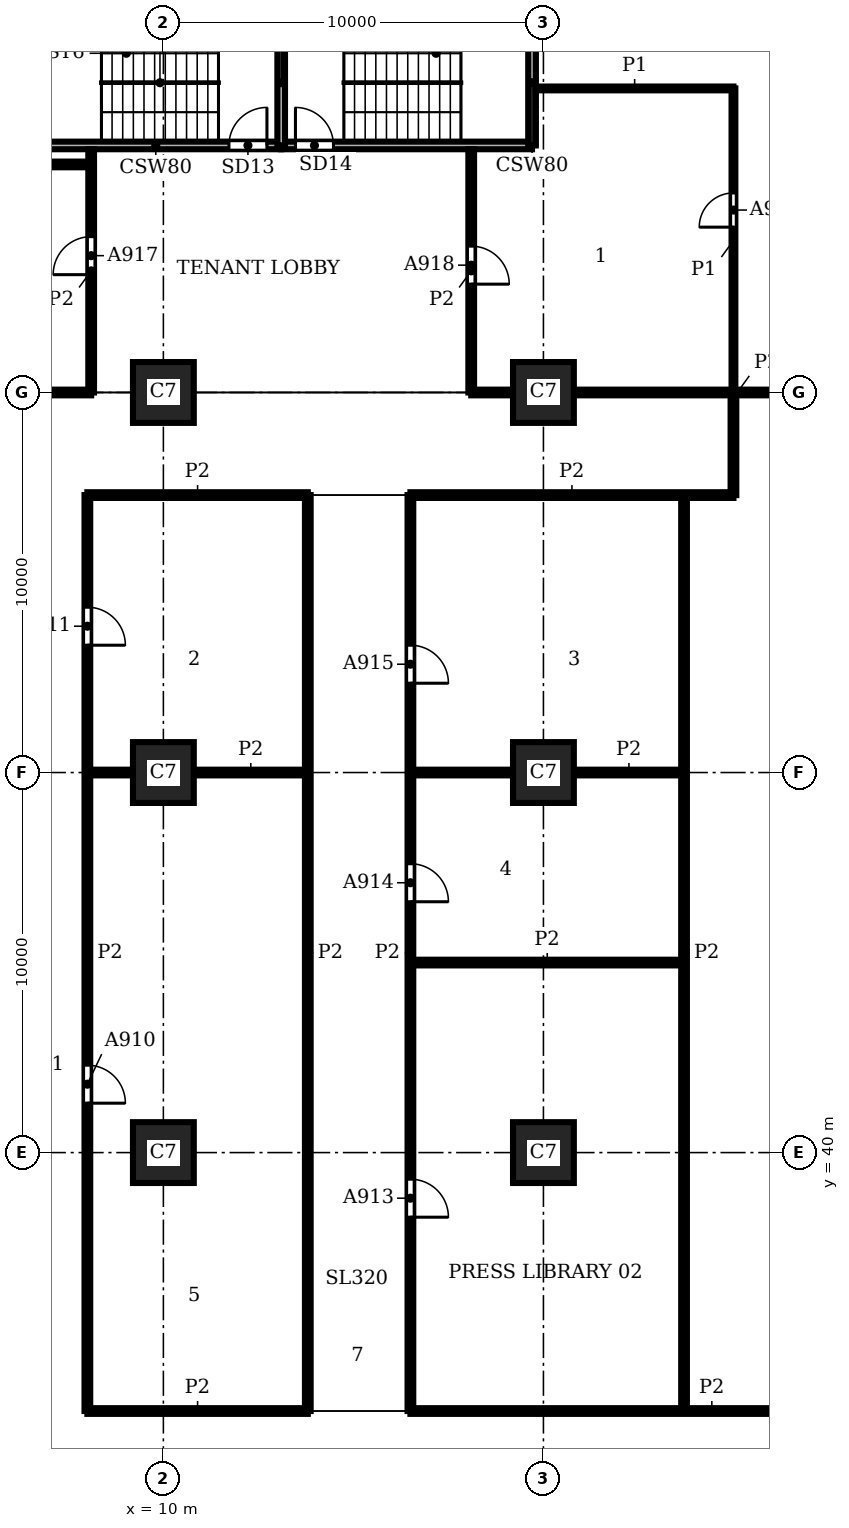
"""IFC4 building model, lengths in metres.
Left out: names, types, materials, properties, quantities, classifications, styles, units other than length and angle.
Written with IfcOpenShell. Run it as: python <this file> out.ifc"""

import sys

from ifc_helpers import new_model, si_unit, direction, frame, frame_2d, origin, origin_2d, place, context, subcontext, project, spatial, rectangle, extrude, element, fill, save


model = new_model("IFC4")
c1 = context("Model", 3, precision=1e-05, world=origin(), true_north=direction((0.0, 1.0)))
c2 = subcontext(c1, "Body", "Model", "MODEL_VIEW")
j1 = project(units=[si_unit("LENGTHUNIT", "METRE"), si_unit("PLANEANGLEUNIT", "RADIAN")], contexts=[c1])
p1 = place(None, origin())
s1 = spatial("IfcSite", under=j1, at=p1, CompositionType="ELEMENT")
p2 = place(p1, origin())
s2 = spatial("IfcBuilding", under=s1, at=p2, CompositionType="ELEMENT")
p3 = place(p2, frame((0.0, 0.0, 113.4)))
s3 = spatial("IfcBuildingStorey", under=s2, at=p3, CompositionType="ELEMENT", Elevation=113.4)
for number, where, z_axis, x_axis in (
    (1, (10.0, 40.0, 0.0), (0.0, 0.0, 1.0), (1.0, 0.0, 0.0)),
    (2, (10.0, 50.0, 0.0), (0.0, 0.0, 1.0), (1.0, 0.0, 0.0)),
    (3, (10.0, 60.0, 0.0), (0.0, 0.0, 1.0), (1.0, 0.0, 0.0)),
    (4, (20.0, 40.0, 0.0), (0.0, 0.0, 1.0), (1.0, 0.0, 0.0)),
    (5, (20.0, 50.0, 0.0), (0.0, 0.0, 1.0), (1.0, 0.0, 0.0)),
    (6, (20.0, 60.0, 0.0), (0.0, 0.0, 1.0), (1.0, 0.0, 0.0)),
):
    element("IfcColumn", number, at=place(p3, frame(where, z_axis=z_axis, x_axis=x_axis)), inside=s3, PredefinedType="COLUMN", context=c2, shape_type="SweptSolid", body=[
        extrude(rectangle(XDim=1.6, YDim=1.6, at=origin_2d()), origin(), (0.0, 0.0, 1.0), 3.9),
    ])
p4 = place(p3, frame((6.5, 66.5, 0.0), z_axis=(0.0, 0.0, 1.0), x_axis=(1.0, 0.0, 0.0)))
e7 = element("IfcWall", 7, at=p4, inside=s3, PredefinedType="SHEAR", context=c2, shape_type="SweptSolid", body=[
    extrude(rectangle(XDim=6.6, YDim=0.2, at=frame_2d((3.3, 0.0))), origin(), (0.0, 0.0, 1.0), 3.45),
])
p5 = place(p4, frame((5.225, 0.0, 0.0)))
e8 = element("IfcOpeningElement", 8, at=p5, cuts=e7, PredefinedType="OPENING", context=c2, shape_type="SweptSolid", body=[
    extrude(rectangle(XDim=1.0, YDim=2.1, at=frame_2d((0.5, 1.05))), frame((0.0, 0.11, 0.0), z_axis=(0.0, -1.0, 0.0), x_axis=(1.0, 0.0, 0.0)), (0.0, 0.0, 1.0), 0.22),
])
p6 = place(p3, frame((13.1, 66.5, 0.0), z_axis=(0.0, 0.0, 1.0), x_axis=(1.0, 0.0, 0.0)))
e9 = element("IfcWall", 9, at=p6, inside=s3, PredefinedType="SHEAR", context=c2, shape_type="SweptSolid", body=[
    extrude(rectangle(XDim=6.6, YDim=0.2, at=frame_2d((3.3, 0.0))), origin(), (0.0, 0.0, 1.0), 3.45),
])
p7 = place(p6, frame((0.375, 0.0, 0.0)))
e10 = element("IfcOpeningElement", 10, at=p7, cuts=e9, PredefinedType="OPENING", context=c2, shape_type="SweptSolid", body=[
    extrude(rectangle(XDim=1.0, YDim=2.1, at=frame_2d((0.5, 1.05))), frame((0.0, 0.11, 0.0), z_axis=(0.0, -1.0, 0.0), x_axis=(1.0, 0.0, 0.0)), (0.0, 0.0, 1.0), 0.22),
])
for number, where, z_axis, x_axis in (
    (11, (13.1, 66.5, 0.0), (0.0, 0.0, 1.0), (0.0, 1.0, 0.0)),
    (12, (19.7, 66.5, 0.0), (0.0, 0.0, 1.0), (0.0, 1.0, 0.0)),
):
    element("IfcWall", number, at=place(p3, frame(where, z_axis=z_axis, x_axis=x_axis)), inside=s3, PredefinedType="SHEAR", context=c2, shape_type="SweptSolid", body=[
        extrude(rectangle(XDim=3.3, YDim=0.2, at=frame_2d((1.65, 0.0))), origin(), (0.0, 0.0, 1.0), 3.45),
    ])
p8 = place(p3, frame((25.0, 60.0, 0.0), z_axis=(0.0, 0.0, 1.0), x_axis=(0.0, 1.0, 0.0)))
e13 = element("IfcWall", 13, at=p8, inside=s3, PredefinedType="PARTITIONING", context=c2, shape_type="SweptSolid", body=[
    extrude(rectangle(XDim=8.0, YDim=0.1, at=frame_2d((4.0, 0.0))), origin(), (0.0, 0.0, 1.0), 3.45),
])
p9 = place(p8, frame((4.35, 0.0, 0.0)))
e14 = element("IfcOpeningElement", 14, at=p9, cuts=e13, PredefinedType="OPENING", context=c2, shape_type="SweptSolid", body=[
    extrude(rectangle(XDim=0.9, YDim=2.1, at=frame_2d((0.45, 1.05))), frame((0.0, 0.06, 0.0), z_axis=(0.0, -1.0, 0.0), x_axis=(1.0, 0.0, 0.0)), (0.0, 0.0, 1.0), 0.12),
])
p10 = place(p3, frame((19.8, 68.0, 0.0), z_axis=(0.0, 0.0, 1.0), x_axis=(1.0, 0.0, 0.0)))
e15 = element("IfcWall", 15, at=p10, inside=s3, PredefinedType="PARTITIONING", context=c2, shape_type="SweptSolid", body=[
    extrude(rectangle(XDim=5.2, YDim=0.1, at=frame_2d((2.6, 0.0))), origin(), (0.0, 0.0, 1.0), 3.45),
])
p11 = place(p3, frame((8.0, 33.2, 0.0), z_axis=(0.0, 0.0, 1.0), x_axis=(0.0, 1.0, 0.0)))
e16 = element("IfcWall", 16, at=p11, inside=s3, PredefinedType="PARTITIONING", context=c2, shape_type="SweptSolid", body=[
    extrude(rectangle(XDim=24.1, YDim=0.15, at=frame_2d((12.05, 0.0))), origin(), (0.0, 0.0, 1.0), 3.45),
])
p12 = place(p11, frame((8.1, 0.0, 0.0)))
e17 = element("IfcOpeningElement", 17, at=p12, cuts=e16, PredefinedType="OPENING", context=c2, shape_type="SweptSolid", body=[
    extrude(rectangle(XDim=1.0, YDim=2.1, at=frame_2d((0.5, 1.05))), frame((0.0, 0.085, 0.0), z_axis=(0.0, -1.0, 0.0), x_axis=(1.0, 0.0, 0.0)), (0.0, 0.0, 1.0), 0.17),
])
p13 = place(p11, frame((20.15, 0.0, 0.0)))
e18 = element("IfcOpeningElement", 18, at=p13, cuts=e16, PredefinedType="OPENING", context=c2, shape_type="SweptSolid", body=[
    extrude(rectangle(XDim=1.0, YDim=2.1, at=frame_2d((0.5, 1.05))), frame((0.0, 0.085, 0.0), z_axis=(0.0, -1.0, 0.0), x_axis=(1.0, 0.0, 0.0)), (0.0, 0.0, 1.0), 0.17),
])
p14 = place(p3, frame((8.1, 60.0, 0.0), z_axis=(0.0, 0.0, 1.0), x_axis=(0.0, 1.0, 0.0)))
e19 = element("IfcWall", 19, at=p14, inside=s3, PredefinedType="PARTITIONING", context=c2, shape_type="SweptSolid", body=[
    extrude(rectangle(XDim=6.4, YDim=0.15, at=frame_2d((3.2, 0.0))), origin(), (0.0, 0.0, 1.0), 3.45),
])
p15 = place(p14, frame((3.1, 0.0, 0.0)))
e20 = element("IfcOpeningElement", 20, at=p15, cuts=e19, PredefinedType="OPENING", context=c2, shape_type="SweptSolid", body=[
    extrude(rectangle(XDim=1.0, YDim=2.1, at=frame_2d((0.5, 1.05))), frame((0.0, 0.085, 0.0), z_axis=(0.0, -1.0, 0.0), x_axis=(1.0, 0.0, 0.0)), (0.0, 0.0, 1.0), 0.17),
])
p16 = place(p3, frame((13.8, 33.2, 0.0), z_axis=(0.0, 0.0, 1.0), x_axis=(0.0, 1.0, 0.0)))
e21 = element("IfcWall", 21, at=p16, inside=s3, PredefinedType="PARTITIONING", context=c2, shape_type="SweptSolid", body=[
    extrude(rectangle(XDim=24.1, YDim=0.15, at=frame_2d((12.05, 0.0))), origin(), (0.0, 0.0, 1.0), 3.45),
])
p17 = place(p3, frame((16.5, 33.2, 0.0), z_axis=(0.0, 0.0, 1.0), x_axis=(0.0, 1.0, 0.0)))
e22 = element("IfcWall", 22, at=p17, inside=s3, PredefinedType="PARTITIONING", context=c2, shape_type="SweptSolid", body=[
    extrude(rectangle(XDim=24.1, YDim=0.15, at=frame_2d((12.05, 0.0))), origin(), (0.0, 0.0, 1.0), 3.45),
])
p18 = place(p17, frame((5.1, 0.0, 0.0)))
e23 = element("IfcOpeningElement", 23, at=p18, cuts=e22, PredefinedType="OPENING", context=c2, shape_type="SweptSolid", body=[
    extrude(rectangle(XDim=1.0, YDim=2.1, at=frame_2d((0.5, 1.05))), frame((0.0, 0.085, 0.0), z_axis=(0.0, -1.0, 0.0), x_axis=(1.0, 0.0, 0.0)), (0.0, 0.0, 1.0), 0.17),
])
p19 = place(p17, frame((13.4, 0.0, 0.0)))
e24 = element("IfcOpeningElement", 24, at=p19, cuts=e22, PredefinedType="OPENING", context=c2, shape_type="SweptSolid", body=[
    extrude(rectangle(XDim=1.0, YDim=2.1, at=frame_2d((0.5, 1.05))), frame((0.0, 0.085, 0.0), z_axis=(0.0, -1.0, 0.0), x_axis=(1.0, 0.0, 0.0)), (0.0, 0.0, 1.0), 0.17),
])
p20 = place(p17, frame((19.15, 0.0, 0.0)))
e25 = element("IfcOpeningElement", 25, at=p20, cuts=e22, PredefinedType="OPENING", context=c2, shape_type="SweptSolid", body=[
    extrude(rectangle(XDim=1.0, YDim=2.1, at=frame_2d((0.5, 1.05))), frame((0.0, 0.085, 0.0), z_axis=(0.0, -1.0, 0.0), x_axis=(1.0, 0.0, 0.0)), (0.0, 0.0, 1.0), 0.17),
])
p21 = place(p3, frame((18.1, 60.0, 0.0), z_axis=(0.0, 0.0, 1.0), x_axis=(0.0, 1.0, 0.0)))
e26 = element("IfcWall", 26, at=p21, inside=s3, PredefinedType="PARTITIONING", context=c2, shape_type="SweptSolid", body=[
    extrude(rectangle(XDim=6.4, YDim=0.15, at=frame_2d((3.2, 0.0))), origin(), (0.0, 0.0, 1.0), 3.45),
])
p22 = place(p21, frame((2.85, 0.0, 0.0)))
e27 = element("IfcOpeningElement", 27, at=p22, cuts=e26, PredefinedType="OPENING", context=c2, shape_type="SweptSolid", body=[
    extrude(rectangle(XDim=1.0, YDim=2.1, at=frame_2d((0.5, 1.05))), frame((0.0, 0.085, 0.0), z_axis=(0.0, -1.0, 0.0), x_axis=(1.0, 0.0, 0.0)), (0.0, 0.0, 1.0), 0.17),
])
p23 = place(p3, frame((23.7, 33.2, 0.0), z_axis=(0.0, 0.0, 1.0), x_axis=(0.0, 1.0, 0.0)))
e28 = element("IfcWall", 28, at=p23, inside=s3, PredefinedType="PARTITIONING", context=c2, shape_type="SweptSolid", body=[
    extrude(rectangle(XDim=24.1, YDim=0.15, at=frame_2d((12.05, 0.0))), origin(), (0.0, 0.0, 1.0), 3.45),
])
p24 = place(p3, frame((25.0, 57.3, 0.0), z_axis=(0.0, 0.0, 1.0), x_axis=(0.0, 1.0, 0.0)))
e29 = element("IfcWall", 29, at=p24, inside=s3, PredefinedType="PARTITIONING", context=c2, shape_type="SweptSolid", body=[
    extrude(rectangle(XDim=2.7, YDim=0.15, at=frame_2d((1.35, 0.0))), origin(), (0.0, 0.0, 1.0), 3.45),
])
p25 = place(p3, frame((8.0, 33.2, 0.0), z_axis=(0.0, 0.0, 1.0), x_axis=(1.0, 0.0, 0.0)))
e30 = element("IfcWall", 30, at=p25, inside=s3, PredefinedType="PARTITIONING", context=c2, shape_type="SweptSolid", body=[
    extrude(rectangle(XDim=5.8, YDim=0.15, at=frame_2d((2.9, 0.0))), origin(), (0.0, 0.0, 1.0), 3.45),
])
p26 = place(p3, frame((16.5, 33.2, 0.0), z_axis=(0.0, 0.0, 1.0), x_axis=(1.0, 0.0, 0.0)))
e31 = element("IfcWall", 31, at=p26, inside=s3, PredefinedType="PARTITIONING", context=c2, shape_type="SweptSolid", body=[
    extrude(rectangle(XDim=15.862, YDim=0.15, at=frame_2d((7.931, 0.0))), origin(), (0.0, 0.0, 1.0), 3.45),
])
p27 = place(p26, frame((10.05, 0.0, 0.0)))
e32 = element("IfcOpeningElement", 32, at=p27, cuts=e31, PredefinedType="OPENING", context=c2, shape_type="SweptSolid", body=[
    extrude(rectangle(XDim=1.8, YDim=2.1, at=frame_2d((0.9, 1.05))), frame((0.0, 0.085, 0.0), z_axis=(0.0, -1.0, 0.0), x_axis=(1.0, 0.0, 0.0)), (0.0, 0.0, 1.0), 0.17),
])
p28 = place(p3, frame((16.5, 45.0, 0.0), z_axis=(0.0, 0.0, 1.0), x_axis=(1.0, 0.0, 0.0)))
e33 = element("IfcWall", 33, at=p28, inside=s3, PredefinedType="PARTITIONING", context=c2, shape_type="SweptSolid", body=[
    extrude(rectangle(XDim=7.2, YDim=0.15, at=frame_2d((3.6, 0.0))), origin(), (0.0, 0.0, 1.0), 3.45),
])
p29 = place(p3, frame((8.0, 50.0, 0.0), z_axis=(0.0, 0.0, 1.0), x_axis=(1.0, 0.0, 0.0)))
e34 = element("IfcWall", 34, at=p29, inside=s3, PredefinedType="PARTITIONING", context=c2, shape_type="SweptSolid", body=[
    extrude(rectangle(XDim=1.2, YDim=0.15, at=frame_2d((0.6, 0.0))), origin(), (0.0, 0.0, 1.0), 3.45),
])
p30 = place(p3, frame((10.8, 50.0, 0.0), z_axis=(0.0, 0.0, 1.0), x_axis=(1.0, 0.0, 0.0)))
e35 = element("IfcWall", 35, at=p30, inside=s3, PredefinedType="PARTITIONING", context=c2, shape_type="SweptSolid", body=[
    extrude(rectangle(XDim=3.0, YDim=0.15, at=frame_2d((1.5, 0.0))), origin(), (0.0, 0.0, 1.0), 3.45),
])
p31 = place(p3, frame((16.5, 50.0, 0.0), z_axis=(0.0, 0.0, 1.0), x_axis=(1.0, 0.0, 0.0)))
e36 = element("IfcWall", 36, at=p31, inside=s3, PredefinedType="PARTITIONING", context=c2, shape_type="SweptSolid", body=[
    extrude(rectangle(XDim=2.7, YDim=0.15, at=frame_2d((1.35, 0.0))), origin(), (0.0, 0.0, 1.0), 3.45),
])
p32 = place(p3, frame((20.8, 50.0, 0.0), z_axis=(0.0, 0.0, 1.0), x_axis=(1.0, 0.0, 0.0)))
e37 = element("IfcWall", 37, at=p32, inside=s3, PredefinedType="PARTITIONING", context=c2, shape_type="SweptSolid", body=[
    extrude(rectangle(XDim=2.9, YDim=0.15, at=frame_2d((1.45, 0.0))), origin(), (0.0, 0.0, 1.0), 3.45),
])
p33 = place(p3, frame((8.0, 57.3, 0.0), z_axis=(0.0, 0.0, 1.0), x_axis=(1.0, 0.0, 0.0)))
e38 = element("IfcWall", 38, at=p33, inside=s3, PredefinedType="PARTITIONING", context=c2, shape_type="SweptSolid", body=[
    extrude(rectangle(XDim=5.8, YDim=0.15, at=frame_2d((2.9, 0.0))), origin(), (0.0, 0.0, 1.0), 3.45),
])
p34 = place(p3, frame((16.5, 57.3, 0.0), z_axis=(0.0, 0.0, 1.0), x_axis=(1.0, 0.0, 0.0)))
e39 = element("IfcWall", 39, at=p34, inside=s3, PredefinedType="PARTITIONING", context=c2, shape_type="SweptSolid", body=[
    extrude(rectangle(XDim=8.5, YDim=0.15, at=frame_2d((4.25, 0.0))), origin(), (0.0, 0.0, 1.0), 3.45),
])
p35 = place(p3, frame((0.6, 60.0, 0.0), z_axis=(0.0, 0.0, 1.0), x_axis=(1.0, 0.0, 0.0)))
e40 = element("IfcWall", 40, at=p35, inside=s3, PredefinedType="PARTITIONING", context=c2, shape_type="SweptSolid", body=[
    extrude(rectangle(XDim=7.5, YDim=0.15, at=frame_2d((3.75, 0.0))), origin(), (0.0, 0.0, 1.0), 3.45),
])
p36 = place(p3, frame((18.1, 60.0, 0.0), z_axis=(0.0, 0.0, 1.0), x_axis=(1.0, 0.0, 0.0)))
e41 = element("IfcWall", 41, at=p36, inside=s3, PredefinedType="PARTITIONING", context=c2, shape_type="SweptSolid", body=[
    extrude(rectangle(XDim=1.1, YDim=0.15, at=frame_2d((0.55, 0.0))), origin(), (0.0, 0.0, 1.0), 3.45),
])
p37 = place(p3, frame((20.8, 60.0, 0.0), z_axis=(0.0, 0.0, 1.0), x_axis=(1.0, 0.0, 0.0)))
e42 = element("IfcWall", 42, at=p37, inside=s3, PredefinedType="PARTITIONING", context=c2, shape_type="SweptSolid", body=[
    extrude(rectangle(XDim=8.6, YDim=0.15, at=frame_2d((4.3, 0.0))), origin(), (0.0, 0.0, 1.0), 3.45),
])
p38 = place(p3, frame((0.644, 66.0, 0.0), z_axis=(0.0, 0.0, 1.0), x_axis=(1.0, 0.0, 0.0)))
e43 = element("IfcWall", 43, at=p38, inside=s3, PredefinedType="PARTITIONING", context=c2, shape_type="SweptSolid", body=[
    extrude(rectangle(XDim=7.456, YDim=0.15, at=frame_2d((3.728, 0.0))), origin(), (0.0, 0.0, 1.0), 3.45),
])
p39 = place(p5, origin())
e44 = element("IfcDoor", 44, at=p39, inside=s3, OperationType="SINGLE_SWING_RIGHT", PredefinedType="DOOR", context=c2, shape_type="SweptSolid", body=[
    extrude(rectangle(XDim=1.0, YDim=2.1, at=frame_2d((0.5, 1.05))), frame((0.0, 0.025, 0.0), z_axis=(0.0, -1.0, 0.0), x_axis=(1.0, 0.0, 0.0)), (0.0, 0.0, 1.0), 0.05),
])
fill(e8, e44)
p40 = place(p7, origin())
e45 = element("IfcDoor", 45, at=p40, inside=s3, OperationType="SINGLE_SWING_LEFT", PredefinedType="DOOR", context=c2, shape_type="SweptSolid", body=[
    extrude(rectangle(XDim=1.0, YDim=2.1, at=frame_2d((0.5, 1.05))), frame((0.0, 0.025, 0.0), z_axis=(0.0, -1.0, 0.0), x_axis=(1.0, 0.0, 0.0)), (0.0, 0.0, 1.0), 0.05),
])
fill(e10, e45)
p41 = place(p12, frame((1.0, 0.0, 0.0), z_axis=(0.0, 0.0, 1.0), x_axis=(-1.0, 0.0, 0.0)))
e46 = element("IfcDoor", 46, at=p41, inside=s3, OperationType="SINGLE_SWING_RIGHT", PredefinedType="DOOR", context=c2, shape_type="SweptSolid", body=[
    extrude(rectangle(XDim=1.0, YDim=2.1, at=frame_2d((0.5, 1.05))), frame((0.0, 0.025, 0.0), z_axis=(0.0, -1.0, 0.0), x_axis=(1.0, 0.0, 0.0)), (0.0, 0.0, 1.0), 0.05),
])
fill(e17, e46)
p42 = place(p13, frame((1.0, 0.0, 0.0), z_axis=(0.0, 0.0, 1.0), x_axis=(-1.0, 0.0, 0.0)))
e47 = element("IfcDoor", 47, at=p42, inside=s3, OperationType="SINGLE_SWING_RIGHT", PredefinedType="DOOR", context=c2, shape_type="SweptSolid", body=[
    extrude(rectangle(XDim=1.0, YDim=2.1, at=frame_2d((0.5, 1.05))), frame((0.0, 0.025, 0.0), z_axis=(0.0, -1.0, 0.0), x_axis=(1.0, 0.0, 0.0)), (0.0, 0.0, 1.0), 0.05),
])
fill(e18, e47)
p43 = place(p18, frame((1.0, 0.0, 0.0), z_axis=(0.0, 0.0, 1.0), x_axis=(-1.0, 0.0, 0.0)))
e48 = element("IfcDoor", 48, at=p43, inside=s3, OperationType="SINGLE_SWING_RIGHT", PredefinedType="DOOR", context=c2, shape_type="SweptSolid", body=[
    extrude(rectangle(XDim=1.0, YDim=2.1, at=frame_2d((0.5, 1.05))), frame((0.0, 0.025, 0.0), z_axis=(0.0, -1.0, 0.0), x_axis=(1.0, 0.0, 0.0)), (0.0, 0.0, 1.0), 0.05),
])
fill(e23, e48)
p44 = place(p19, frame((1.0, 0.0, 0.0), z_axis=(0.0, 0.0, 1.0), x_axis=(-1.0, 0.0, 0.0)))
e49 = element("IfcDoor", 49, at=p44, inside=s3, OperationType="SINGLE_SWING_RIGHT", PredefinedType="DOOR", context=c2, shape_type="SweptSolid", body=[
    extrude(rectangle(XDim=1.0, YDim=2.1, at=frame_2d((0.5, 1.05))), frame((0.0, 0.025, 0.0), z_axis=(0.0, -1.0, 0.0), x_axis=(1.0, 0.0, 0.0)), (0.0, 0.0, 1.0), 0.05),
])
fill(e24, e49)
p45 = place(p20, frame((1.0, 0.0, 0.0), z_axis=(0.0, 0.0, 1.0), x_axis=(-1.0, 0.0, 0.0)))
e50 = element("IfcDoor", 50, at=p45, inside=s3, OperationType="SINGLE_SWING_RIGHT", PredefinedType="DOOR", context=c2, shape_type="SweptSolid", body=[
    extrude(rectangle(XDim=1.0, YDim=2.1, at=frame_2d((0.5, 1.05))), frame((0.0, 0.025, 0.0), z_axis=(0.0, -1.0, 0.0), x_axis=(1.0, 0.0, 0.0)), (0.0, 0.0, 1.0), 0.05),
])
fill(e25, e50)
p46 = place(p15, origin())
e51 = element("IfcDoor", 51, at=p46, inside=s3, OperationType="SINGLE_SWING_LEFT", PredefinedType="DOOR", context=c2, shape_type="SweptSolid", body=[
    extrude(rectangle(XDim=1.0, YDim=2.1, at=frame_2d((0.5, 1.05))), frame((0.0, 0.025, 0.0), z_axis=(0.0, -1.0, 0.0), x_axis=(1.0, 0.0, 0.0)), (0.0, 0.0, 1.0), 0.05),
])
fill(e20, e51)
p47 = place(p22, frame((1.0, 0.0, 0.0), z_axis=(0.0, 0.0, 1.0), x_axis=(-1.0, 0.0, 0.0)))
e52 = element("IfcDoor", 52, at=p47, inside=s3, OperationType="SINGLE_SWING_RIGHT", PredefinedType="DOOR", context=c2, shape_type="SweptSolid", body=[
    extrude(rectangle(XDim=1.0, YDim=2.1, at=frame_2d((0.5, 1.05))), frame((0.0, 0.025, 0.0), z_axis=(0.0, -1.0, 0.0), x_axis=(1.0, 0.0, 0.0)), (0.0, 0.0, 1.0), 0.05),
])
fill(e27, e52)
p48 = place(p9, origin())
e53 = element("IfcDoor", 53, at=p48, inside=s3, OperationType="SINGLE_SWING_LEFT", PredefinedType="DOOR", context=c2, shape_type="SweptSolid", body=[
    extrude(rectangle(XDim=0.9, YDim=2.1, at=frame_2d((0.45, 1.05))), frame((0.0, 0.025, 0.0), z_axis=(0.0, -1.0, 0.0), x_axis=(1.0, 0.0, 0.0)), (0.0, 0.0, 1.0), 0.05),
])
fill(e14, e53)
save(model, sys.argv[1])
